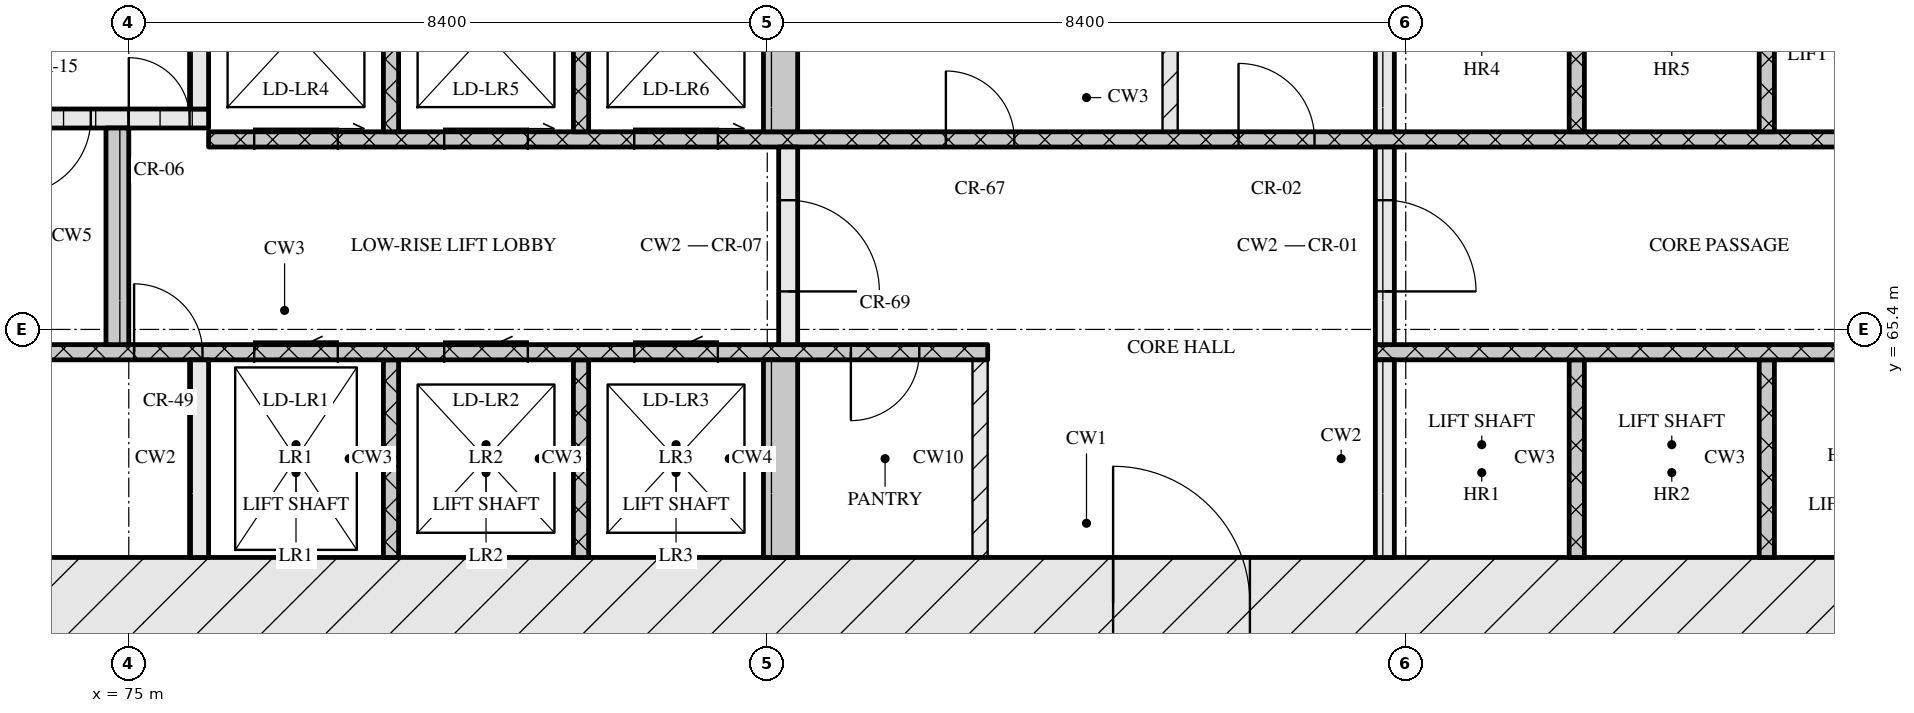
"""IFC4 building model, lengths in metres.
Left out: names, types, materials, properties, quantities, classifications, styles, units other than length and angle.
Written with IfcOpenShell. Run it as: python <this file> out.ifc"""

import sys

from ifc_helpers import new_model, si_unit, direction, frame, frame_2d, origin, place, context, subcontext, project, spatial, rectangle, extrude, element, fill, save


model = new_model("IFC4")
c1 = context("Model", 3, precision=1e-05, world=origin(), true_north=direction((0.0, 1.0)))
c2 = subcontext(c1, "Body", "Model", "MODEL_VIEW")
j1 = project(units=[si_unit("LENGTHUNIT", "METRE"), si_unit("PLANEANGLEUNIT", "RADIAN")], contexts=[c1])
p1 = place(None, origin())
s1 = spatial("IfcSite", under=j1, at=p1, CompositionType="ELEMENT")
p2 = place(p1, origin())
s2 = spatial("IfcBuilding", under=s1, at=p2, CompositionType="ELEMENT")
p3 = place(p2, frame((0.0, 0.0, 80.4)))
s3 = spatial("IfcBuildingStorey", under=s2, at=p3, CompositionType="ELEMENT", Elevation=80.4)
p4 = place(p3, frame((66.6, 61.8, 0.0), z_axis=(0.0, 0.0, 1.0), x_axis=(1.0, 0.0, 0.0)))
e1 = element("IfcWall", 1, at=p4, inside=s3, PredefinedType="SOLIDWALL", context=c2, shape_type="SweptSolid", body=[
    extrude(rectangle(XDim=42.0, YDim=1.2, at=frame_2d((21.0, 0.0))), origin(), (0.0, 0.0, 1.0), 3.3),
])
p5 = place(p4, frame((21.35, 0.0, 0.0)))
e2 = element("IfcOpeningElement", 2, at=p5, cuts=e1, PredefinedType="OPENING", context=c2, shape_type="SweptSolid", body=[
    extrude(rectangle(XDim=1.8, YDim=2.1, at=frame_2d((0.9, 1.05))), frame((0.0, 0.61, 0.0), z_axis=(0.0, -1.0, 0.0), x_axis=(1.0, 0.0, 0.0)), (0.0, 0.0, 1.0), 1.22),
])
p6 = place(p3, frame((75.925, 62.4, 0.0), z_axis=(0.0, 0.0, 1.0), x_axis=(0.0, 1.0, 0.0)))
e3 = element("IfcWall", 3, at=p6, inside=s3, PredefinedType="SOLIDWALL", context=c2, shape_type="SweptSolid", body=[
    extrude(rectangle(XDim=2.6, YDim=0.25, at=frame_2d((1.3, 0.0))), origin(), (0.0, 0.0, 1.0), 3.3),
])
for number, where, z_axis, x_axis in (
    (4, (78.45, 62.4, 0.0), (0.0, 0.0, 1.0), (0.0, 1.0, 0.0)),
    (5, (80.95, 62.4, 0.0), (0.0, 0.0, 1.0), (0.0, 1.0, 0.0)),
):
    element("IfcWall", number, at=place(p3, frame(where, z_axis=z_axis, x_axis=x_axis)), inside=s3, PredefinedType="SOLIDWALL", context=c2, shape_type="SweptSolid", body=[
        extrude(rectangle(XDim=2.6, YDim=0.2, at=frame_2d((1.3, 0.0))), origin(), (0.0, 0.0, 1.0), 3.3),
    ])
p7 = place(p3, frame((83.575, 62.4, 0.0), z_axis=(0.0, 0.0, 1.0), x_axis=(0.0, 1.0, 0.0)))
e6 = element("IfcWall", 6, at=p7, inside=s3, PredefinedType="SOLIDWALL", context=c2, shape_type="SweptSolid", body=[
    extrude(rectangle(XDim=2.6, YDim=0.45, at=frame_2d((1.3, 0.0))), origin(), (0.0, 0.0, 1.0), 3.3),
])
p8 = place(p3, frame((86.2, 62.4, 0.0), z_axis=(0.0, 0.0, 1.0), x_axis=(0.0, 1.0, 0.0)))
e7 = element("IfcWall", 7, at=p8, inside=s3, PredefinedType="PARTITIONING", context=c2, shape_type="SweptSolid", body=[
    extrude(rectangle(XDim=2.6, YDim=0.2, at=frame_2d((1.3, 0.0))), origin(), (0.0, 0.0, 1.0), 3.3),
])
p9 = place(p3, frame((91.525, 62.4, 0.0), z_axis=(0.0, 0.0, 1.0), x_axis=(0.0, 1.0, 0.0)))
e8 = element("IfcWall", 8, at=p9, inside=s3, PredefinedType="SOLIDWALL", context=c2, shape_type="SweptSolid", body=[
    extrude(rectangle(XDim=2.6, YDim=0.25, at=frame_2d((1.3, 0.0))), origin(), (0.0, 0.0, 1.0), 3.3),
])
for number, where, z_axis, x_axis in (
    (9, (94.05, 62.4, 0.0), (0.0, 0.0, 1.0), (0.0, 1.0, 0.0)),
    (10, (96.55, 62.4, 0.0), (0.0, 0.0, 1.0), (0.0, 1.0, 0.0)),
):
    element("IfcWall", number, at=place(p3, frame(where, z_axis=z_axis, x_axis=x_axis)), inside=s3, PredefinedType="SOLIDWALL", context=c2, shape_type="SweptSolid", body=[
        extrude(rectangle(XDim=2.6, YDim=0.2, at=frame_2d((1.3, 0.0))), origin(), (0.0, 0.0, 1.0), 3.3),
    ])
p10 = place(p3, frame((67.8, 65.1, 0.0), z_axis=(0.0, 0.0, 1.0), x_axis=(1.0, 0.0, 0.0)))
e11 = element("IfcWall", 11, at=p10, inside=s3, PredefinedType="SOLIDWALL", context=c2, shape_type="SweptSolid", body=[
    extrude(rectangle(XDim=18.5, YDim=0.2, at=frame_2d((9.25, 0.0))), origin(), (0.0, 0.0, 1.0), 3.3),
])
p11 = place(p10, frame((7.27, 0.0, 0.0)))
e12 = element("IfcOpeningElement", 12, at=p11, cuts=e11, PredefinedType="OPENING", context=c2, shape_type="SweptSolid", body=[
    extrude(rectangle(XDim=0.9, YDim=2.1, at=frame_2d((0.45, 1.05))), frame((0.0, 0.11, 0.0), z_axis=(0.0, -1.0, 0.0), x_axis=(1.0, 0.0, 0.0)), (0.0, 0.0, 1.0), 0.22),
])
p12 = place(p10, frame((8.85, 0.0, 0.0)))
e13 = element("IfcOpeningElement", 13, at=p12, cuts=e11, PredefinedType="OPENING", context=c2, shape_type="SweptSolid", body=[
    extrude(rectangle(XDim=1.1, YDim=2.1, at=frame_2d((0.55, 1.05))), frame((0.0, 0.11, 0.0), z_axis=(0.0, -1.0, 0.0), x_axis=(1.0, 0.0, 0.0)), (0.0, 0.0, 1.0), 0.22),
])
p13 = place(p10, frame((11.35, 0.0, 0.0)))
e14 = element("IfcOpeningElement", 14, at=p13, cuts=e11, PredefinedType="OPENING", context=c2, shape_type="SweptSolid", body=[
    extrude(rectangle(XDim=1.1, YDim=2.1, at=frame_2d((0.55, 1.05))), frame((0.0, 0.11, 0.0), z_axis=(0.0, -1.0, 0.0), x_axis=(1.0, 0.0, 0.0)), (0.0, 0.0, 1.0), 0.22),
])
p14 = place(p10, frame((13.85, 0.0, 0.0)))
e15 = element("IfcOpeningElement", 15, at=p14, cuts=e11, PredefinedType="OPENING", context=c2, shape_type="SweptSolid", body=[
    extrude(rectangle(XDim=1.1, YDim=2.1, at=frame_2d((0.55, 1.05))), frame((0.0, 0.11, 0.0), z_axis=(0.0, -1.0, 0.0), x_axis=(1.0, 0.0, 0.0)), (0.0, 0.0, 1.0), 0.22),
])
p15 = place(p10, frame((16.7, 0.0, 0.0)))
e16 = element("IfcOpeningElement", 16, at=p15, cuts=e11, PredefinedType="OPENING", context=c2, shape_type="SweptSolid", body=[
    extrude(rectangle(XDim=0.9, YDim=2.1, at=frame_2d((0.45, 1.05))), frame((0.0, 0.11, 0.0), z_axis=(0.0, -1.0, 0.0), x_axis=(1.0, 0.0, 0.0)), (0.0, 0.0, 1.0), 0.22),
])
p16 = place(p3, frame((91.4, 65.1, 0.0), z_axis=(0.0, 0.0, 1.0), x_axis=(1.0, 0.0, 0.0)))
e17 = element("IfcWall", 17, at=p16, inside=s3, PredefinedType="SOLIDWALL", context=c2, shape_type="SweptSolid", body=[
    extrude(rectangle(XDim=16.0, YDim=0.2, at=frame_2d((8.0, 0.0))), origin(), (0.0, 0.0, 1.0), 3.3),
])
p17 = place(p16, frame((7.83, 0.0, 0.0)))
e18 = element("IfcOpeningElement", 18, at=p17, cuts=e17, PredefinedType="OPENING", context=c2, shape_type="SweptSolid", body=[
    extrude(rectangle(XDim=0.9, YDim=2.1, at=frame_2d((0.45, 1.05))), frame((0.0, 0.11, 0.0), z_axis=(0.0, -1.0, 0.0), x_axis=(1.0, 0.0, 0.0)), (0.0, 0.0, 1.0), 0.22),
])
p18 = place(p3, frame((74.85, 65.2, 0.0), z_axis=(0.0, 0.0, 1.0), x_axis=(0.0, 1.0, 0.0)))
e19 = element("IfcWall", 19, at=p18, inside=s3, PredefinedType="SOLIDWALL", context=c2, shape_type="SweptSolid", body=[
    extrude(rectangle(XDim=2.85, YDim=0.3, at=frame_2d((1.425, 0.0))), origin(), (0.0, 0.0, 1.0), 3.3),
])
p19 = place(p3, frame((83.675, 65.2, 0.0), z_axis=(0.0, 0.0, 1.0), x_axis=(0.0, 1.0, 0.0)))
e20 = element("IfcWall", 20, at=p19, inside=s3, PredefinedType="SOLIDWALL", context=c2, shape_type="SweptSolid", body=[
    extrude(rectangle(XDim=2.6, YDim=0.25, at=frame_2d((1.3, 0.0))), origin(), (0.0, 0.0, 1.0), 3.3),
])
p20 = place(p19, frame((0.7, 0.0, 0.0)))
e21 = element("IfcOpeningElement", 21, at=p20, cuts=e20, PredefinedType="OPENING", context=c2, shape_type="SweptSolid", body=[
    extrude(rectangle(XDim=1.2, YDim=2.1, at=frame_2d((0.6, 1.05))), frame((0.0, 0.135, 0.0), z_axis=(0.0, -1.0, 0.0), x_axis=(1.0, 0.0, 0.0)), (0.0, 0.0, 1.0), 0.27),
])
p21 = place(p3, frame((91.525, 65.2, 0.0), z_axis=(0.0, 0.0, 1.0), x_axis=(0.0, 1.0, 0.0)))
e22 = element("IfcWall", 22, at=p21, inside=s3, PredefinedType="SOLIDWALL", context=c2, shape_type="SweptSolid", body=[
    extrude(rectangle(XDim=2.6, YDim=0.25, at=frame_2d((1.3, 0.0))), origin(), (0.0, 0.0, 1.0), 3.3),
])
p22 = place(p21, frame((0.7, 0.0, 0.0)))
e23 = element("IfcOpeningElement", 23, at=p22, cuts=e22, PredefinedType="OPENING", context=c2, shape_type="SweptSolid", body=[
    extrude(rectangle(XDim=1.2, YDim=2.1, at=frame_2d((0.6, 1.05))), frame((0.0, 0.135, 0.0), z_axis=(0.0, -1.0, 0.0), x_axis=(1.0, 0.0, 0.0)), (0.0, 0.0, 1.0), 0.27),
])
p23 = place(p3, frame((76.05, 67.9, 0.0), z_axis=(0.0, 0.0, 1.0), x_axis=(1.0, 0.0, 0.0)))
e24 = element("IfcWall", 24, at=p23, inside=s3, PredefinedType="SOLIDWALL", context=c2, shape_type="SweptSolid", body=[
    extrude(rectangle(XDim=23.1, YDim=0.2, at=frame_2d((11.55, 0.0))), origin(), (0.0, 0.0, 1.0), 3.3),
])
p24 = place(p23, frame((0.6, 0.0, 0.0)))
e25 = element("IfcOpeningElement", 25, at=p24, cuts=e24, PredefinedType="OPENING", context=c2, shape_type="SweptSolid", body=[
    extrude(rectangle(XDim=1.1, YDim=2.1, at=frame_2d((0.55, 1.05))), frame((0.0, 0.11, 0.0), z_axis=(0.0, -1.0, 0.0), x_axis=(1.0, 0.0, 0.0)), (0.0, 0.0, 1.0), 0.22),
])
p25 = place(p23, frame((3.1, 0.0, 0.0)))
e26 = element("IfcOpeningElement", 26, at=p25, cuts=e24, PredefinedType="OPENING", context=c2, shape_type="SweptSolid", body=[
    extrude(rectangle(XDim=1.1, YDim=2.1, at=frame_2d((0.55, 1.05))), frame((0.0, 0.11, 0.0), z_axis=(0.0, -1.0, 0.0), x_axis=(1.0, 0.0, 0.0)), (0.0, 0.0, 1.0), 0.22),
])
p26 = place(p23, frame((5.6, 0.0, 0.0)))
e27 = element("IfcOpeningElement", 27, at=p26, cuts=e24, PredefinedType="OPENING", context=c2, shape_type="SweptSolid", body=[
    extrude(rectangle(XDim=1.1, YDim=2.1, at=frame_2d((0.55, 1.05))), frame((0.0, 0.11, 0.0), z_axis=(0.0, -1.0, 0.0), x_axis=(1.0, 0.0, 0.0)), (0.0, 0.0, 1.0), 0.22),
])
p27 = place(p23, frame((9.7, 0.0, 0.0)))
e28 = element("IfcOpeningElement", 28, at=p27, cuts=e24, PredefinedType="OPENING", context=c2, shape_type="SweptSolid", body=[
    extrude(rectangle(XDim=0.9, YDim=2.1, at=frame_2d((0.45, 1.05))), frame((0.0, 0.11, 0.0), z_axis=(0.0, -1.0, 0.0), x_axis=(1.0, 0.0, 0.0)), (0.0, 0.0, 1.0), 0.22),
])
p28 = place(p23, frame((13.55, 0.0, 0.0)))
e29 = element("IfcOpeningElement", 29, at=p28, cuts=e24, PredefinedType="OPENING", context=c2, shape_type="SweptSolid", body=[
    extrude(rectangle(XDim=1.0, YDim=2.1, at=frame_2d((0.5, 1.05))), frame((0.0, 0.11, 0.0), z_axis=(0.0, -1.0, 0.0), x_axis=(1.0, 0.0, 0.0)), (0.0, 0.0, 1.0), 0.22),
])
for number, where, z_axis, x_axis in (
    (30, (78.45, 68.0, 0.0), (0.0, 0.0, 1.0), (0.0, 1.0, 0.0)),
    (31, (80.95, 68.0, 0.0), (0.0, 0.0, 1.0), (0.0, 1.0, 0.0)),
):
    element("IfcWall", number, at=place(p3, frame(where, z_axis=z_axis, x_axis=x_axis)), inside=s3, PredefinedType="SOLIDWALL", context=c2, shape_type="SweptSolid", body=[
        extrude(rectangle(XDim=2.6, YDim=0.2, at=frame_2d((1.3, 0.0))), origin(), (0.0, 0.0, 1.0), 3.3),
    ])
p29 = place(p3, frame((83.575, 68.0, 0.0), z_axis=(0.0, 0.0, 1.0), x_axis=(0.0, 1.0, 0.0)))
e32 = element("IfcWall", 32, at=p29, inside=s3, PredefinedType="SOLIDWALL", context=c2, shape_type="SweptSolid", body=[
    extrude(rectangle(XDim=2.6, YDim=0.45, at=frame_2d((1.3, 0.0))), origin(), (0.0, 0.0, 1.0), 3.3),
])
p30 = place(p3, frame((88.7, 68.0, 0.0), z_axis=(0.0, 0.0, 1.0), x_axis=(0.0, 1.0, 0.0)))
e33 = element("IfcWall", 33, at=p30, inside=s3, PredefinedType="PARTITIONING", context=c2, shape_type="SweptSolid", body=[
    extrude(rectangle(XDim=2.6, YDim=0.2, at=frame_2d((1.3, 0.0))), origin(), (0.0, 0.0, 1.0), 3.3),
])
p31 = place(p3, frame((91.525, 68.0, 0.0), z_axis=(0.0, 0.0, 1.0), x_axis=(0.0, 1.0, 0.0)))
e34 = element("IfcWall", 34, at=p31, inside=s3, PredefinedType="SOLIDWALL", context=c2, shape_type="SweptSolid", body=[
    extrude(rectangle(XDim=2.6, YDim=0.25, at=frame_2d((1.3, 0.0))), origin(), (0.0, 0.0, 1.0), 3.3),
])
for number, where, z_axis, x_axis in (
    (35, (94.05, 68.0, 0.0), (0.0, 0.0, 1.0), (0.0, 1.0, 0.0)),
    (36, (96.55, 68.0, 0.0), (0.0, 0.0, 1.0), (0.0, 1.0, 0.0)),
):
    element("IfcWall", number, at=place(p3, frame(where, z_axis=z_axis, x_axis=x_axis)), inside=s3, PredefinedType="SOLIDWALL", context=c2, shape_type="SweptSolid", body=[
        extrude(rectangle(XDim=2.6, YDim=0.2, at=frame_2d((1.3, 0.0))), origin(), (0.0, 0.0, 1.0), 3.3),
    ])
p32 = place(p3, frame((67.8, 68.175, 0.0), z_axis=(0.0, 0.0, 1.0), x_axis=(1.0, 0.0, 0.0)))
e37 = element("IfcWall", 37, at=p32, inside=s3, PredefinedType="SOLIDWALL", context=c2, shape_type="SweptSolid", body=[
    extrude(rectangle(XDim=8.25, YDim=0.25, at=frame_2d((4.125, 0.0))), origin(), (0.0, 0.0, 1.0), 3.3),
])
p33 = place(p32, frame((5.7, 0.0, 0.0)))
e38 = element("IfcOpeningElement", 38, at=p33, cuts=e37, PredefinedType="OPENING", context=c2, shape_type="SweptSolid", body=[
    extrude(rectangle(XDim=1.0, YDim=2.1, at=frame_2d((0.5, 1.05))), frame((0.0, 0.135, 0.0), z_axis=(0.0, -1.0, 0.0), x_axis=(1.0, 0.0, 0.0)), (0.0, 0.0, 1.0), 0.27),
])
p34 = place(p32, frame((7.2, 0.0, 0.0)))
e39 = element("IfcOpeningElement", 39, at=p34, cuts=e37, PredefinedType="OPENING", context=c2, shape_type="SweptSolid", body=[
    extrude(rectangle(XDim=0.8, YDim=2.1, at=frame_2d((0.4, 1.05))), frame((0.0, 0.135, 0.0), z_axis=(0.0, -1.0, 0.0), x_axis=(1.0, 0.0, 0.0)), (0.0, 0.0, 1.0), 0.27),
])
p35 = place(p3, frame((75.925, 68.3, 0.0), z_axis=(0.0, 0.0, 1.0), x_axis=(0.0, 1.0, 0.0)))
e40 = element("IfcWall", 40, at=p35, inside=s3, PredefinedType="SOLIDWALL", context=c2, shape_type="SweptSolid", body=[
    extrude(rectangle(XDim=2.3, YDim=0.25, at=frame_2d((1.15, 0.0))), origin(), (0.0, 0.0, 1.0), 3.3),
])
p36 = place(p5, origin())
e41 = element("IfcDoor", 41, at=p36, inside=s3, OperationType="DOUBLE_DOOR_SINGLE_SWING", PredefinedType="DOOR", context=c2, shape_type="SweptSolid", body=[
    extrude(rectangle(XDim=1.8, YDim=2.1, at=frame_2d((0.9, 1.05))), frame((0.0, 0.025, 0.0), z_axis=(0.0, -1.0, 0.0), x_axis=(1.0, 0.0, 0.0)), (0.0, 0.0, 1.0), 0.05),
])
fill(e2, e41)
p37 = place(p11, origin())
e42 = element("IfcDoor", 42, at=p37, inside=s3, OperationType="SINGLE_SWING_LEFT", PredefinedType="DOOR", context=c2, shape_type="SweptSolid", body=[
    extrude(rectangle(XDim=0.9, YDim=2.1, at=frame_2d((0.45, 1.05))), frame((0.0, 0.025, 0.0), z_axis=(0.0, -1.0, 0.0), x_axis=(1.0, 0.0, 0.0)), (0.0, 0.0, 1.0), 0.05),
])
fill(e12, e42)
p38 = place(p12, origin())
e43 = element("IfcDoor", 43, at=p38, inside=s3, OperationType="SLIDING_TO_LEFT", PredefinedType="DOOR", context=c2, shape_type="SweptSolid", body=[
    extrude(rectangle(XDim=1.1, YDim=2.1, at=frame_2d((0.55, 1.05))), frame((0.0, 0.025, 0.0), z_axis=(0.0, -1.0, 0.0), x_axis=(1.0, 0.0, 0.0)), (0.0, 0.0, 1.0), 0.05),
])
fill(e13, e43)
p39 = place(p13, origin())
e44 = element("IfcDoor", 44, at=p39, inside=s3, OperationType="SLIDING_TO_LEFT", PredefinedType="DOOR", context=c2, shape_type="SweptSolid", body=[
    extrude(rectangle(XDim=1.1, YDim=2.1, at=frame_2d((0.55, 1.05))), frame((0.0, 0.025, 0.0), z_axis=(0.0, -1.0, 0.0), x_axis=(1.0, 0.0, 0.0)), (0.0, 0.0, 1.0), 0.05),
])
fill(e14, e44)
p40 = place(p14, origin())
e45 = element("IfcDoor", 45, at=p40, inside=s3, OperationType="SLIDING_TO_LEFT", PredefinedType="DOOR", context=c2, shape_type="SweptSolid", body=[
    extrude(rectangle(XDim=1.1, YDim=2.1, at=frame_2d((0.55, 1.05))), frame((0.0, 0.025, 0.0), z_axis=(0.0, -1.0, 0.0), x_axis=(1.0, 0.0, 0.0)), (0.0, 0.0, 1.0), 0.05),
])
fill(e15, e45)
p41 = place(p15, origin())
e46 = element("IfcDoor", 46, at=p41, inside=s3, OperationType="SINGLE_SWING_RIGHT", PredefinedType="DOOR", context=c2, shape_type="SweptSolid", body=[
    extrude(rectangle(XDim=0.9, YDim=2.1, at=frame_2d((0.45, 1.05))), frame((0.0, 0.025, 0.0), z_axis=(0.0, -1.0, 0.0), x_axis=(1.0, 0.0, 0.0)), (0.0, 0.0, 1.0), 0.05),
])
fill(e16, e46)
p42 = place(p20, origin())
e47 = element("IfcDoor", 47, at=p42, inside=s3, OperationType="SINGLE_SWING_RIGHT", PredefinedType="DOOR", context=c2, shape_type="SweptSolid", body=[
    extrude(rectangle(XDim=1.2, YDim=2.1, at=frame_2d((0.6, 1.05))), frame((0.0, 0.025, 0.0), z_axis=(0.0, -1.0, 0.0), x_axis=(1.0, 0.0, 0.0)), (0.0, 0.0, 1.0), 0.05),
])
fill(e21, e47)
p43 = place(p22, origin())
e48 = element("IfcDoor", 48, at=p43, inside=s3, OperationType="SINGLE_SWING_RIGHT", PredefinedType="DOOR", context=c2, shape_type="SweptSolid", body=[
    extrude(rectangle(XDim=1.2, YDim=2.1, at=frame_2d((0.6, 1.05))), frame((0.0, 0.025, 0.0), z_axis=(0.0, -1.0, 0.0), x_axis=(1.0, 0.0, 0.0)), (0.0, 0.0, 1.0), 0.05),
])
fill(e23, e48)
p44 = place(p24, origin())
e49 = element("IfcDoor", 49, at=p44, inside=s3, OperationType="SLIDING_TO_RIGHT", PredefinedType="DOOR", context=c2, shape_type="SweptSolid", body=[
    extrude(rectangle(XDim=1.1, YDim=2.1, at=frame_2d((0.55, 1.05))), frame((0.0, 0.025, 0.0), z_axis=(0.0, -1.0, 0.0), x_axis=(1.0, 0.0, 0.0)), (0.0, 0.0, 1.0), 0.05),
])
fill(e25, e49)
p45 = place(p25, origin())
e50 = element("IfcDoor", 50, at=p45, inside=s3, OperationType="SLIDING_TO_RIGHT", PredefinedType="DOOR", context=c2, shape_type="SweptSolid", body=[
    extrude(rectangle(XDim=1.1, YDim=2.1, at=frame_2d((0.55, 1.05))), frame((0.0, 0.025, 0.0), z_axis=(0.0, -1.0, 0.0), x_axis=(1.0, 0.0, 0.0)), (0.0, 0.0, 1.0), 0.05),
])
fill(e26, e50)
p46 = place(p26, origin())
e51 = element("IfcDoor", 51, at=p46, inside=s3, OperationType="SLIDING_TO_RIGHT", PredefinedType="DOOR", context=c2, shape_type="SweptSolid", body=[
    extrude(rectangle(XDim=1.1, YDim=2.1, at=frame_2d((0.55, 1.05))), frame((0.0, 0.025, 0.0), z_axis=(0.0, -1.0, 0.0), x_axis=(1.0, 0.0, 0.0)), (0.0, 0.0, 1.0), 0.05),
])
fill(e27, e51)
p47 = place(p27, origin())
e52 = element("IfcDoor", 52, at=p47, inside=s3, OperationType="SINGLE_SWING_LEFT", PredefinedType="DOOR", context=c2, shape_type="SweptSolid", body=[
    extrude(rectangle(XDim=0.9, YDim=2.1, at=frame_2d((0.45, 1.05))), frame((0.0, 0.025, 0.0), z_axis=(0.0, -1.0, 0.0), x_axis=(1.0, 0.0, 0.0)), (0.0, 0.0, 1.0), 0.05),
])
fill(e28, e52)
p48 = place(p28, origin())
e53 = element("IfcDoor", 53, at=p48, inside=s3, OperationType="SINGLE_SWING_LEFT", PredefinedType="DOOR", context=c2, shape_type="SweptSolid", body=[
    extrude(rectangle(XDim=1.0, YDim=2.1, at=frame_2d((0.5, 1.05))), frame((0.0, 0.025, 0.0), z_axis=(0.0, -1.0, 0.0), x_axis=(1.0, 0.0, 0.0)), (0.0, 0.0, 1.0), 0.05),
])
fill(e29, e53)
p49 = place(p33, origin())
e54 = element("IfcDoor", 54, at=p49, inside=s3, OperationType="SINGLE_SWING_RIGHT", PredefinedType="DOOR", context=c2, shape_type="SweptSolid", body=[
    extrude(rectangle(XDim=1.0, YDim=2.1, at=frame_2d((0.5, 1.05))), frame((0.0, 0.025, 0.0), z_axis=(0.0, -1.0, 0.0), x_axis=(1.0, 0.0, 0.0)), (0.0, 0.0, 1.0), 0.05),
])
fill(e38, e54)
p50 = place(p34, origin())
e55 = element("IfcDoor", 55, at=p50, inside=s3, OperationType="SINGLE_SWING_LEFT", PredefinedType="DOOR", context=c2, shape_type="SweptSolid", body=[
    extrude(rectangle(XDim=0.8, YDim=2.1, at=frame_2d((0.4, 1.05))), frame((0.0, 0.025, 0.0), z_axis=(0.0, -1.0, 0.0), x_axis=(1.0, 0.0, 0.0)), (0.0, 0.0, 1.0), 0.05),
])
fill(e39, e55)
save(model, sys.argv[1])
